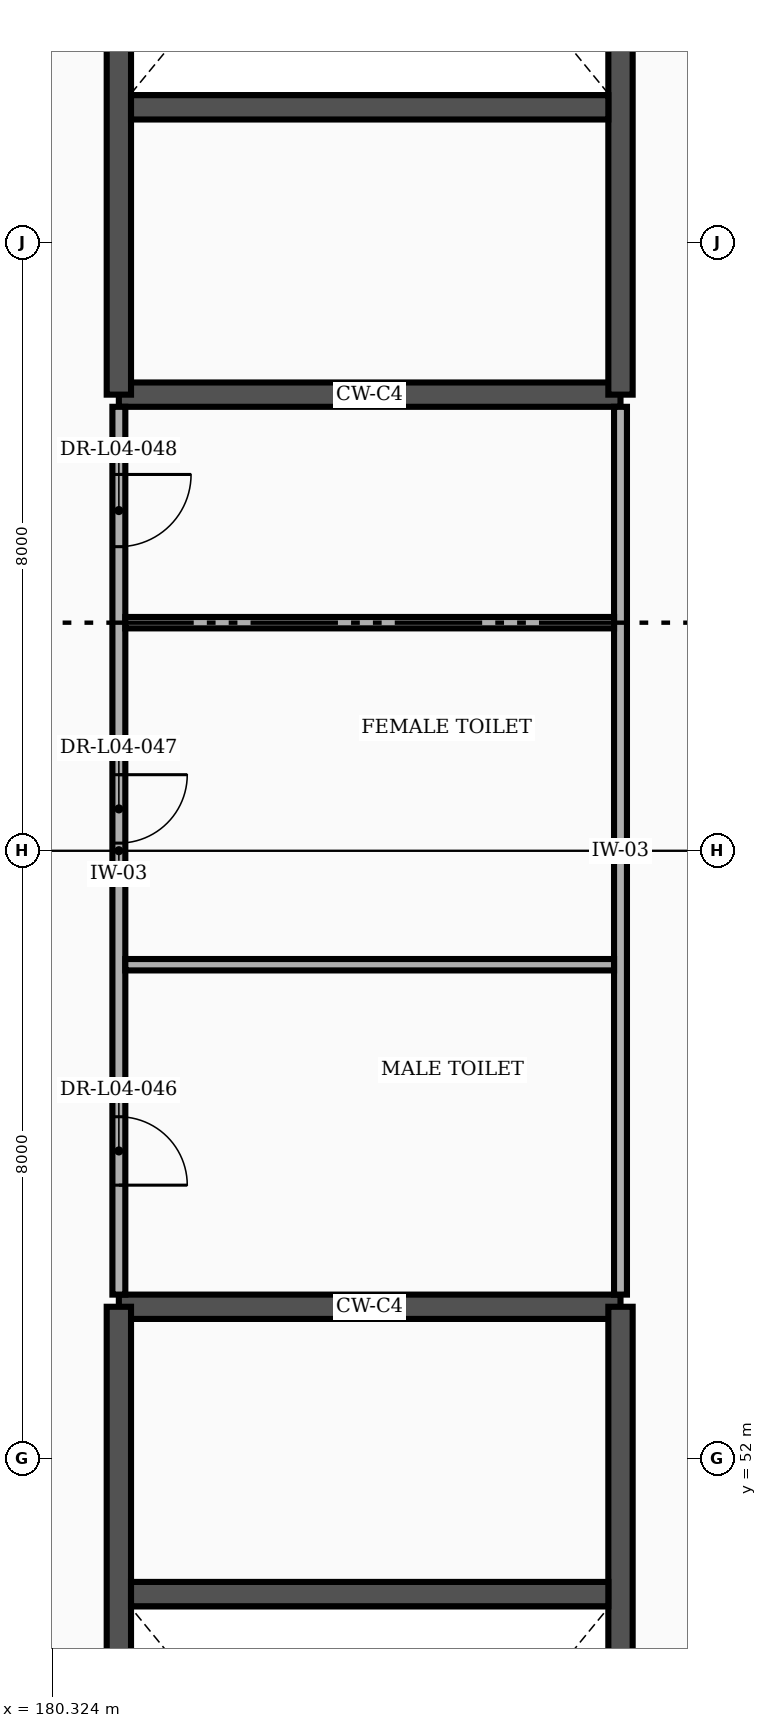
"""IFC4 building model, lengths in metres.
Left out: names, types, materials, properties, quantities, classifications, styles, units other than length and angle.
Written with IfcOpenShell. Run it as: python <this file> out.ifc"""

import sys

from ifc_helpers import new_model, si_unit, direction, frame, frame_2d, origin, place, context, subcontext, project, spatial, rectangle, extrude, element, fill, save


model = new_model("IFC4")
c1 = context("Model", 3, precision=1e-05, world=origin(), true_north=direction((0.0, 1.0)))
c2 = subcontext(c1, "Body", "Model", "MODEL_VIEW")
j1 = project(units=[si_unit("LENGTHUNIT", "METRE"), si_unit("PLANEANGLEUNIT", "RADIAN")], contexts=[c1])
p1 = place(None, origin())
s1 = spatial("IfcSite", under=j1, at=p1, CompositionType="ELEMENT")
p2 = place(p1, origin())
s2 = spatial("IfcBuilding", under=s1, at=p2, CompositionType="ELEMENT")
p3 = place(p2, frame((0.0, 0.0, 21.6)))
s3 = spatial("IfcBuildingStorey", under=s2, at=p3, CompositionType="ELEMENT", Elevation=21.6)
p4 = place(p3, frame((181.2, 54.0, 0.0), z_axis=(0.0, 0.0, 1.0), x_axis=(1.0, 0.0, 0.0)))
e1 = element("IfcWall", 1, at=p4, inside=s3, PredefinedType="SHEAR", context=c2, shape_type="SweptSolid", body=[
    extrude(rectangle(XDim=6.6, YDim=0.32, at=frame_2d((3.3, 0.0))), origin(), (0.0, 0.0, 1.0), 3.585),
])
p5 = place(p3, frame((181.2, 39.4, 0.0), z_axis=(0.0, 0.0, 1.0), x_axis=(0.0, 1.0, 0.0)))
e2 = element("IfcWall", 2, at=p5, inside=s3, PredefinedType="SHEAR", context=c2, shape_type="SweptSolid", body=[
    extrude(rectangle(XDim=14.6, YDim=0.32, at=frame_2d((7.3, 0.0))), origin(), (0.0, 0.0, 1.0), 3.585),
])
p6 = place(p5, frame((0.55, 0.0, 0.0)))
e3 = element("IfcOpeningElement", 3, at=p6, cuts=e2, PredefinedType="OPENING", context=c2, shape_type="SweptSolid", body=[
    extrude(rectangle(XDim=2.4, YDim=2.25, at=frame_2d((1.2, 1.125))), frame((0.0, 0.172, 0.0), z_axis=(0.0, -1.0, 0.0), x_axis=(1.0, 0.0, 0.0)), (0.0, 0.0, 1.0), 0.344),
])
p7 = place(p3, frame((187.8, 39.4, 0.0), z_axis=(0.0, 0.0, 1.0), x_axis=(0.0, 1.0, 0.0)))
e4 = element("IfcWall", 4, at=p7, inside=s3, PredefinedType="SHEAR", context=c2, shape_type="SweptSolid", body=[
    extrude(rectangle(XDim=14.6, YDim=0.32, at=frame_2d((7.3, 0.0))), origin(), (0.0, 0.0, 1.0), 3.585),
])
p8 = place(p3, frame((181.36, 50.22, 0.0), z_axis=(0.0, 0.0, 1.0), x_axis=(1.0, 0.0, 0.0)))
e5 = element("IfcWall", 5, at=p8, inside=s3, PredefinedType="SHEAR", context=c2, shape_type="SweptSolid", body=[
    extrude(rectangle(XDim=6.28, YDim=0.32, at=frame_2d((3.14, 0.0))), origin(), (0.0, 0.0, 1.0), 3.585),
])
p9 = place(p3, frame((181.2, 66.0, 0.0), z_axis=(0.0, 0.0, 1.0), x_axis=(1.0, 0.0, 0.0)))
e6 = element("IfcWall", 6, at=p9, inside=s3, PredefinedType="SHEAR", context=c2, shape_type="SweptSolid", body=[
    extrude(rectangle(XDim=6.6, YDim=0.32, at=frame_2d((3.3, 0.0))), origin(), (0.0, 0.0, 1.0), 3.585),
])
p10 = place(p3, frame((181.2, 66.0, 0.0), z_axis=(0.0, 0.0, 1.0), x_axis=(0.0, 1.0, 0.0)))
e7 = element("IfcWall", 7, at=p10, inside=s3, PredefinedType="SHEAR", context=c2, shape_type="SweptSolid", body=[
    extrude(rectangle(XDim=14.6, YDim=0.32, at=frame_2d((7.3, 0.0))), origin(), (0.0, 0.0, 1.0), 3.585),
])
p11 = place(p10, frame((11.65, 0.0, 0.0)))
e8 = element("IfcOpeningElement", 8, at=p11, cuts=e7, PredefinedType="OPENING", context=c2, shape_type="SweptSolid", body=[
    extrude(rectangle(XDim=2.4, YDim=2.25, at=frame_2d((1.2, 1.125))), frame((0.0, 0.172, 0.0), z_axis=(0.0, -1.0, 0.0), x_axis=(1.0, 0.0, 0.0)), (0.0, 0.0, 1.0), 0.344),
])
p12 = place(p3, frame((187.8, 66.0, 0.0), z_axis=(0.0, 0.0, 1.0), x_axis=(0.0, 1.0, 0.0)))
e9 = element("IfcWall", 9, at=p12, inside=s3, PredefinedType="SHEAR", context=c2, shape_type="SweptSolid", body=[
    extrude(rectangle(XDim=14.6, YDim=0.32, at=frame_2d((7.3, 0.0))), origin(), (0.0, 0.0, 1.0), 3.585),
])
p13 = place(p3, frame((181.36, 69.78, 0.0), z_axis=(0.0, 0.0, 1.0), x_axis=(1.0, 0.0, 0.0)))
e10 = element("IfcWall", 10, at=p13, inside=s3, PredefinedType="SHEAR", context=c2, shape_type="SweptSolid", body=[
    extrude(rectangle(XDim=6.28, YDim=0.32, at=frame_2d((3.14, 0.0))), origin(), (0.0, 0.0, 1.0), 3.585),
])
p14 = place(p3, frame((187.8, 54.16, 0.0), z_axis=(0.0, 0.0, 1.0), x_axis=(0.0, 1.0, 0.0)))
e11 = element("IfcWall", 11, at=p14, inside=s3, PredefinedType="PARTITIONING", context=c2, shape_type="SweptSolid", body=[
    extrude(rectangle(XDim=11.68, YDim=0.17, at=frame_2d((5.84, 0.0))), origin(), (0.0, 0.0, 1.0), 3.585),
])
p15 = place(p3, frame((181.2, 54.16, 0.0), z_axis=(0.0, 0.0, 1.0), x_axis=(0.0, 1.0, 0.0)))
e12 = element("IfcWall", 12, at=p15, inside=s3, PredefinedType="PARTITIONING", context=c2, shape_type="SweptSolid", body=[
    extrude(rectangle(XDim=11.68, YDim=0.17, at=frame_2d((5.84, 0.0))), origin(), (0.0, 0.0, 1.0), 3.585),
])
p16 = place(p15, frame((1.44, 0.0, 0.0)))
e13 = element("IfcOpeningElement", 13, at=p16, cuts=e12, PredefinedType="OPENING", context=c2, shape_type="SweptSolid", body=[
    extrude(rectangle(XDim=0.9, YDim=2.1, at=frame_2d((0.45, 1.05))), frame((0.0, 0.097, 0.0), z_axis=(0.0, -1.0, 0.0), x_axis=(1.0, 0.0, 0.0)), (0.0, 0.0, 1.0), 0.194),
])
p17 = place(p15, frame((5.94, 0.0, 0.0)))
e14 = element("IfcOpeningElement", 14, at=p17, cuts=e12, PredefinedType="OPENING", context=c2, shape_type="SweptSolid", body=[
    extrude(rectangle(XDim=0.9, YDim=2.1, at=frame_2d((0.45, 1.05))), frame((0.0, 0.097, 0.0), z_axis=(0.0, -1.0, 0.0), x_axis=(1.0, 0.0, 0.0)), (0.0, 0.0, 1.0), 0.194),
])
p18 = place(p15, frame((9.84, 0.0, 0.0)))
e15 = element("IfcOpeningElement", 15, at=p18, cuts=e12, PredefinedType="OPENING", context=c2, shape_type="SweptSolid", body=[
    extrude(rectangle(XDim=0.95, YDim=2.1, at=frame_2d((0.475, 1.05))), frame((0.0, 0.097, 0.0), z_axis=(0.0, -1.0, 0.0), x_axis=(1.0, 0.0, 0.0)), (0.0, 0.0, 1.0), 0.194),
])
for number, where, z_axis, x_axis in (
    (16, (181.285, 58.5, 0.0), (0.0, 0.0, 1.0), (1.0, 0.0, 0.0)),
    (17, (181.285, 63.0, 0.0), (0.0, 0.0, 1.0), (1.0, 0.0, 0.0)),
):
    element("IfcWall", number, at=place(p3, frame(where, z_axis=z_axis, x_axis=x_axis)), inside=s3, PredefinedType="PARTITIONING", context=c2, shape_type="SweptSolid", body=[
        extrude(rectangle(XDim=6.43, YDim=0.15, at=frame_2d((3.215, 0.0))), origin(), (0.0, 0.0, 1.0), 3.585),
    ])
p19 = place(p16, frame((0.9, 0.0, 0.0), z_axis=(0.0, 0.0, 1.0), x_axis=(-1.0, 0.0, 0.0)))
e18 = element("IfcDoor", 18, at=p19, inside=s3, OperationType="SINGLE_SWING_RIGHT", PredefinedType="DOOR", context=c2, shape_type="SweptSolid", body=[
    extrude(rectangle(XDim=0.9, YDim=2.1, at=frame_2d((0.45, 1.05))), frame((0.0, 0.025, 0.0), z_axis=(0.0, -1.0, 0.0), x_axis=(1.0, 0.0, 0.0)), (0.0, 0.0, 1.0), 0.05),
])
fill(e13, e18)
p20 = place(p17, frame((0.9, 0.0, 0.0), z_axis=(0.0, 0.0, 1.0), x_axis=(-1.0, 0.0, 0.0)))
e19 = element("IfcDoor", 19, at=p20, inside=s3, OperationType="SINGLE_SWING_LEFT", PredefinedType="DOOR", context=c2, shape_type="SweptSolid", body=[
    extrude(rectangle(XDim=0.9, YDim=2.1, at=frame_2d((0.45, 1.05))), frame((0.0, 0.025, 0.0), z_axis=(0.0, -1.0, 0.0), x_axis=(1.0, 0.0, 0.0)), (0.0, 0.0, 1.0), 0.05),
])
fill(e14, e19)
p21 = place(p18, frame((0.95, 0.0, 0.0), z_axis=(0.0, 0.0, 1.0), x_axis=(-1.0, 0.0, 0.0)))
e20 = element("IfcDoor", 20, at=p21, inside=s3, OperationType="SINGLE_SWING_LEFT", PredefinedType="DOOR", context=c2, shape_type="SweptSolid", body=[
    extrude(rectangle(XDim=0.95, YDim=2.1, at=frame_2d((0.475, 1.05))), frame((0.0, 0.025, 0.0), z_axis=(0.0, -1.0, 0.0), x_axis=(1.0, 0.0, 0.0)), (0.0, 0.0, 1.0), 0.05),
])
fill(e15, e20)
save(model, sys.argv[1])
